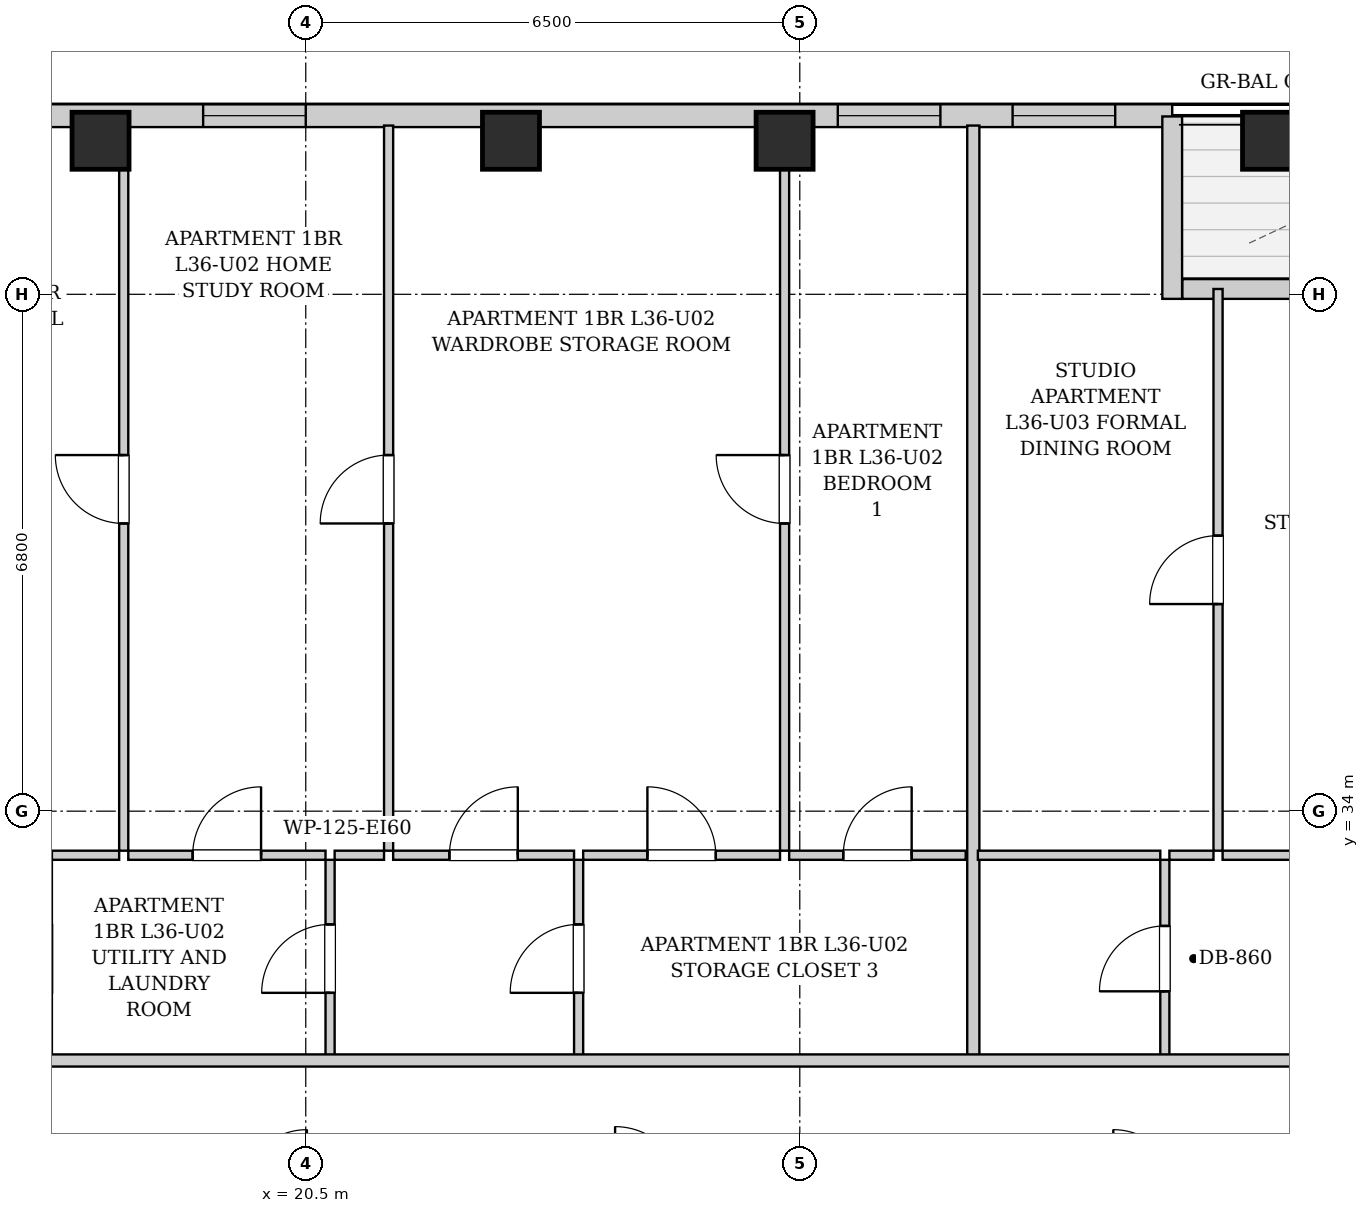
"""IFC4 building model, lengths in metres.
Left out: names, types, materials, properties, quantities, classifications, styles, units other than length and angle.
Written with IfcOpenShell. Run it as: python <this file> out.ifc"""

import sys

from ifc_helpers import new_model, si_unit, direction, frame, frame_2d, origin, origin_2d, place, context, subcontext, project, spatial, rectangle, extrude, element, fill, save


model = new_model("IFC4")
c1 = context("Model", 3, precision=1e-05, world=origin(), true_north=direction((0.0, 1.0)))
c2 = subcontext(c1, "Body", "Model", "MODEL_VIEW")
j1 = project(units=[si_unit("LENGTHUNIT", "METRE"), si_unit("PLANEANGLEUNIT", "RADIAN")], contexts=[c1])
p1 = place(None, origin())
s1 = spatial("IfcSite", under=j1, at=p1, CompositionType="ELEMENT")
p2 = place(p1, origin())
s2 = spatial("IfcBuilding", under=s1, at=p2, CompositionType="ELEMENT")
p3 = place(p2, frame((0.0, 0.0, 127.65)))
s3 = spatial("IfcBuildingStorey", under=s2, at=p3, CompositionType="ELEMENT", Elevation=127.65)
for number, where, z_axis, x_axis in (
    (1, (17.8, 42.82, 0.0), (0.0, 0.0, 1.0), (1.0, 0.0, 0.0)),
    (2, (23.2, 42.82, 0.0), (0.0, 0.0, 1.0), (1.0, 0.0, 0.0)),
    (3, (26.8, 42.82, 0.0), (0.0, 0.0, 1.0), (1.0, 0.0, 0.0)),
    (4, (33.2, 42.82, 0.0), (0.0, 0.0, 1.0), (1.0, 0.0, 0.0)),
):
    element("IfcColumn", number, at=place(p3, frame(where, z_axis=z_axis, x_axis=x_axis)), inside=s3, PredefinedType="COLUMN", context=c2, shape_type="SweptSolid", body=[
        extrude(rectangle(XDim=0.75, YDim=0.75, at=origin_2d()), origin(), (0.0, 0.0, 1.0), 3.25),
    ])
p4 = place(p3, frame((10.0, 43.15, 0.0), z_axis=(0.0, 0.0, 1.0), x_axis=(1.0, 0.0, 0.0)))
e5 = element("IfcWall", 5, at=p4, inside=s3, PredefinedType="SOLIDWALL", context=c2, shape_type="SweptSolid", body=[
    extrude(rectangle(XDim=21.9, YDim=0.3, at=frame_2d((10.95, 0.0))), origin(), (0.0, 0.0, 1.0), 2.99),
])
p5 = place(p4, frame((5.475, 0.0, 0.55)))
e6 = element("IfcOpeningElement", 6, at=p5, cuts=e5, PredefinedType="OPENING", context=c2, shape_type="SweptSolid", body=[
    extrude(rectangle(XDim=1.35, YDim=1.2, at=frame_2d((0.675, 0.6))), frame((0.0, 0.16, 0.0), z_axis=(0.0, -1.0, 0.0), x_axis=(1.0, 0.0, 0.0)), (0.0, 0.0, 1.0), 0.32),
])
p6 = place(p4, frame((9.15, 0.0, 0.55)))
e7 = element("IfcOpeningElement", 7, at=p6, cuts=e5, PredefinedType="OPENING", context=c2, shape_type="SweptSolid", body=[
    extrude(rectangle(XDim=1.35, YDim=1.2, at=frame_2d((0.675, 0.6))), frame((0.0, 0.16, 0.0), z_axis=(0.0, -1.0, 0.0), x_axis=(1.0, 0.0, 0.0)), (0.0, 0.0, 1.0), 0.32),
])
p7 = place(p4, frame((17.5, 0.0, 0.55)))
e8 = element("IfcOpeningElement", 8, at=p7, cuts=e5, PredefinedType="OPENING", context=c2, shape_type="SweptSolid", body=[
    extrude(rectangle(XDim=1.35, YDim=1.2, at=frame_2d((0.675, 0.6))), frame((0.0, 0.16, 0.0), z_axis=(0.0, -1.0, 0.0), x_axis=(1.0, 0.0, 0.0)), (0.0, 0.0, 1.0), 0.32),
])
p8 = place(p4, frame((19.8, 0.0, 0.55)))
e9 = element("IfcOpeningElement", 9, at=p8, cuts=e5, PredefinedType="OPENING", context=c2, shape_type="SweptSolid", body=[
    extrude(rectangle(XDim=1.35, YDim=1.2, at=frame_2d((0.675, 0.6))), frame((0.0, 0.16, 0.0), z_axis=(0.0, -1.0, 0.0), x_axis=(1.0, 0.0, 0.0)), (0.0, 0.0, 1.0), 0.32),
])
p9 = place(p3, frame((31.9, 43.14, 0.0), z_axis=(0.0, 0.0, 1.0), x_axis=(0.0, -1.0, 0.0)))
e10 = element("IfcWall", 10, at=p9, inside=s3, PredefinedType="SOLIDWALL", context=c2, shape_type="SweptSolid", body=[
    extrude(rectangle(XDim=2.4, YDim=0.26, at=frame_2d((1.2, 0.0))), origin(), (0.0, 0.0, 1.0), 2.99),
])
p10 = place(p3, frame((32.034, 40.87, 0.0), z_axis=(0.0, 0.0, 1.0), x_axis=(1.0, 0.0, 0.0)))
e11 = element("IfcWall", 11, at=p10, inside=s3, PredefinedType="SOLIDWALL", context=c2, shape_type="SweptSolid", body=[
    extrude(rectangle(XDim=4.332, YDim=0.26, at=frame_2d((2.166, 0.0))), origin(), (0.0, 0.0, 1.0), 2.99),
])
p11 = place(p10, frame((1.616, 0.0, 0.0)))
e12 = element("IfcOpeningElement", 12, at=p11, cuts=e11, PredefinedType="OPENING", context=c2, shape_type="SweptSolid", body=[
    extrude(rectangle(XDim=1.1, YDim=2.0, at=frame_2d((0.55, 1.0))), frame((0.0, 0.14, 0.0), z_axis=(0.0, -1.0, 0.0), x_axis=(1.0, 0.0, 0.0)), (0.0, 0.0, 1.0), 0.28),
])
p12 = place(p3, frame((20.82, 30.76, 0.0), z_axis=(0.0, 0.0, 1.0), x_axis=(0.0, 1.0, 0.0)))
e13 = element("IfcWall", 13, at=p12, inside=s3, PredefinedType="PARTITIONING", context=c2, shape_type="SweptSolid", body=[
    extrude(rectangle(XDim=2.6, YDim=0.12, at=frame_2d((1.3, 0.0))), origin(), (0.0, 0.0, 1.0), 2.99),
])
p13 = place(p12, frame((0.85, 0.0, 0.0)))
e14 = element("IfcOpeningElement", 14, at=p13, cuts=e13, PredefinedType="OPENING", context=c2, shape_type="SweptSolid", body=[
    extrude(rectangle(XDim=0.9, YDim=2.05, at=frame_2d((0.45, 1.025))), frame((0.0, 0.07, 0.0), z_axis=(0.0, -1.0, 0.0), x_axis=(1.0, 0.0, 0.0)), (0.0, 0.0, 1.0), 0.14),
])
p14 = place(p3, frame((17.16, 33.42, 0.0), z_axis=(0.0, 0.0, 1.0), x_axis=(1.0, 0.0, 0.0)))
e15 = element("IfcWall", 15, at=p14, inside=s3, PredefinedType="PARTITIONING", context=c2, shape_type="SweptSolid", body=[
    extrude(rectangle(XDim=0.885, YDim=0.12, at=frame_2d((0.442, 0.0))), origin(), (0.0, 0.0, 1.0), 2.99),
])
p15 = place(p3, frame((18.165, 33.42, 0.0), z_axis=(0.0, 0.0, 1.0), x_axis=(1.0, 0.0, 0.0)))
e16 = element("IfcWall", 16, at=p15, inside=s3, PredefinedType="PARTITIONING", context=c2, shape_type="SweptSolid", body=[
    extrude(rectangle(XDim=2.595, YDim=0.12, at=frame_2d((1.297, 0.0))), origin(), (0.0, 0.0, 1.0), 2.99),
])
p16 = place(p15, frame((0.847, 0.0, 0.0)))
e17 = element("IfcOpeningElement", 17, at=p16, cuts=e16, PredefinedType="OPENING", context=c2, shape_type="SweptSolid", body=[
    extrude(rectangle(XDim=0.9, YDim=2.05, at=frame_2d((0.45, 1.025))), frame((0.0, 0.07, 0.0), z_axis=(0.0, -1.0, 0.0), x_axis=(1.0, 0.0, 0.0)), (0.0, 0.0, 1.0), 0.14),
])
p17 = place(p3, frame((24.09, 30.76, 0.0), z_axis=(0.0, 0.0, 1.0), x_axis=(0.0, 1.0, 0.0)))
e18 = element("IfcWall", 18, at=p17, inside=s3, PredefinedType="PARTITIONING", context=c2, shape_type="SweptSolid", body=[
    extrude(rectangle(XDim=2.6, YDim=0.12, at=frame_2d((1.3, 0.0))), origin(), (0.0, 0.0, 1.0), 2.99),
])
p18 = place(p17, frame((0.85, 0.0, 0.0)))
e19 = element("IfcOpeningElement", 19, at=p18, cuts=e18, PredefinedType="OPENING", context=c2, shape_type="SweptSolid", body=[
    extrude(rectangle(XDim=0.9, YDim=2.05, at=frame_2d((0.45, 1.025))), frame((0.0, 0.07, 0.0), z_axis=(0.0, -1.0, 0.0), x_axis=(1.0, 0.0, 0.0)), (0.0, 0.0, 1.0), 0.14),
])
p19 = place(p3, frame((20.88, 33.42, 0.0), z_axis=(0.0, 0.0, 1.0), x_axis=(1.0, 0.0, 0.0)))
e20 = element("IfcWall", 20, at=p19, inside=s3, PredefinedType="PARTITIONING", context=c2, shape_type="SweptSolid", body=[
    extrude(rectangle(XDim=0.65, YDim=0.12, at=frame_2d((0.325, 0.0))), origin(), (0.0, 0.0, 1.0), 2.99),
])
p20 = place(p3, frame((21.65, 33.42, 0.0), z_axis=(0.0, 0.0, 1.0), x_axis=(1.0, 0.0, 0.0)))
e21 = element("IfcWall", 21, at=p20, inside=s3, PredefinedType="PARTITIONING", context=c2, shape_type="SweptSolid", body=[
    extrude(rectangle(XDim=2.38, YDim=0.12, at=frame_2d((1.19, 0.0))), origin(), (0.0, 0.0, 1.0), 2.99),
])
p21 = place(p20, frame((0.74, 0.0, 0.0)))
e22 = element("IfcOpeningElement", 22, at=p21, cuts=e21, PredefinedType="OPENING", context=c2, shape_type="SweptSolid", body=[
    extrude(rectangle(XDim=0.9, YDim=2.05, at=frame_2d((0.45, 1.025))), frame((0.0, 0.07, 0.0), z_axis=(0.0, -1.0, 0.0), x_axis=(1.0, 0.0, 0.0)), (0.0, 0.0, 1.0), 0.14),
])
p22 = place(p3, frame((24.15, 33.42, 0.0), z_axis=(0.0, 0.0, 1.0), x_axis=(1.0, 0.0, 0.0)))
e23 = element("IfcWall", 23, at=p22, inside=s3, PredefinedType="PARTITIONING", context=c2, shape_type="SweptSolid", body=[
    extrude(rectangle(XDim=2.59, YDim=0.12, at=frame_2d((1.295, 0.0))), origin(), (0.0, 0.0, 1.0), 2.99),
])
p23 = place(p22, frame((0.845, 0.0, 0.0)))
e24 = element("IfcOpeningElement", 24, at=p23, cuts=e23, PredefinedType="OPENING", context=c2, shape_type="SweptSolid", body=[
    extrude(rectangle(XDim=0.9, YDim=2.05, at=frame_2d((0.45, 1.025))), frame((0.0, 0.07, 0.0), z_axis=(0.0, -1.0, 0.0), x_axis=(1.0, 0.0, 0.0)), (0.0, 0.0, 1.0), 0.14),
])
p24 = place(p3, frame((26.86, 33.42, 0.0), z_axis=(0.0, 0.0, 1.0), x_axis=(1.0, 0.0, 0.0)))
e25 = element("IfcWall", 25, at=p24, inside=s3, PredefinedType="PARTITIONING", context=c2, shape_type="SweptSolid", body=[
    extrude(rectangle(XDim=2.323, YDim=0.12, at=frame_2d((1.162, 0.0))), origin(), (0.0, 0.0, 1.0), 2.99),
])
p25 = place(p24, frame((0.712, 0.0, 0.0)))
e26 = element("IfcOpeningElement", 26, at=p25, cuts=e25, PredefinedType="OPENING", context=c2, shape_type="SweptSolid", body=[
    extrude(rectangle(XDim=0.9, YDim=2.05, at=frame_2d((0.45, 1.025))), frame((0.0, 0.07, 0.0), z_axis=(0.0, -1.0, 0.0), x_axis=(1.0, 0.0, 0.0)), (0.0, 0.0, 1.0), 0.14),
])
p26 = place(p3, frame((18.105, 33.48, 0.0), z_axis=(0.0, 0.0, 1.0), x_axis=(0.0, 1.0, 0.0)))
e27 = element("IfcWall", 27, at=p26, inside=s3, PredefinedType="PARTITIONING", context=c2, shape_type="SweptSolid", body=[
    extrude(rectangle(XDim=9.54, YDim=0.12, at=frame_2d((4.77, 0.0))), origin(), (0.0, 0.0, 1.0), 2.99),
])
p27 = place(p26, frame((4.305, 0.0, 0.0)))
e28 = element("IfcOpeningElement", 28, at=p27, cuts=e27, PredefinedType="OPENING", context=c2, shape_type="SweptSolid", body=[
    extrude(rectangle(XDim=0.9, YDim=2.05, at=frame_2d((0.45, 1.025))), frame((0.0, 0.07, 0.0), z_axis=(0.0, -1.0, 0.0), x_axis=(1.0, 0.0, 0.0)), (0.0, 0.0, 1.0), 0.14),
])
p28 = place(p3, frame((21.59, 33.48, 0.0), z_axis=(0.0, 0.0, 1.0), x_axis=(0.0, 1.0, 0.0)))
e29 = element("IfcWall", 29, at=p28, inside=s3, PredefinedType="PARTITIONING", context=c2, shape_type="SweptSolid", body=[
    extrude(rectangle(XDim=9.54, YDim=0.12, at=frame_2d((4.77, 0.0))), origin(), (0.0, 0.0, 1.0), 2.99),
])
p29 = place(p28, frame((4.305, 0.0, 0.0)))
e30 = element("IfcOpeningElement", 30, at=p29, cuts=e29, PredefinedType="OPENING", context=c2, shape_type="SweptSolid", body=[
    extrude(rectangle(XDim=0.9, YDim=2.05, at=frame_2d((0.45, 1.025))), frame((0.0, 0.07, 0.0), z_axis=(0.0, -1.0, 0.0), x_axis=(1.0, 0.0, 0.0)), (0.0, 0.0, 1.0), 0.14),
])
p30 = place(p3, frame((26.8, 33.48, 0.0), z_axis=(0.0, 0.0, 1.0), x_axis=(0.0, 1.0, 0.0)))
e31 = element("IfcWall", 31, at=p30, inside=s3, PredefinedType="PARTITIONING", context=c2, shape_type="SweptSolid", body=[
    extrude(rectangle(XDim=9.54, YDim=0.12, at=frame_2d((4.77, 0.0))), origin(), (0.0, 0.0, 1.0), 2.99),
])
p31 = place(p30, frame((4.305, 0.0, 0.0)))
e32 = element("IfcOpeningElement", 32, at=p31, cuts=e31, PredefinedType="OPENING", context=c2, shape_type="SweptSolid", body=[
    extrude(rectangle(XDim=0.9, YDim=2.05, at=frame_2d((0.45, 1.025))), frame((0.0, 0.07, 0.0), z_axis=(0.0, -1.0, 0.0), x_axis=(1.0, 0.0, 0.0)), (0.0, 0.0, 1.0), 0.14),
])
p32 = place(p3, frame((29.283, 30.76, 0.0), z_axis=(0.0, 0.0, 1.0), x_axis=(0.0, 1.0, 0.0)))
e33 = element("IfcWall", 33, at=p32, inside=s3, PredefinedType="PARTITIONING", context=c2, shape_type="SweptSolid", body=[
    extrude(rectangle(XDim=12.26, YDim=0.16, at=frame_2d((6.13, 0.0))), origin(), (0.0, 0.0, 1.0), 2.99),
])
p33 = place(p3, frame((31.803, 30.76, 0.0), z_axis=(0.0, 0.0, 1.0), x_axis=(0.0, 1.0, 0.0)))
e34 = element("IfcWall", 34, at=p33, inside=s3, PredefinedType="PARTITIONING", context=c2, shape_type="SweptSolid", body=[
    extrude(rectangle(XDim=2.6, YDim=0.12, at=frame_2d((1.3, 0.0))), origin(), (0.0, 0.0, 1.0), 2.99),
])
p34 = place(p33, frame((0.87, 0.0, 0.0)))
e35 = element("IfcOpeningElement", 35, at=p34, cuts=e34, PredefinedType="OPENING", context=c2, shape_type="SweptSolid", body=[
    extrude(rectangle(XDim=0.86, YDim=2.05, at=frame_2d((0.43, 1.025))), frame((0.0, 0.07, 0.0), z_axis=(0.0, -1.0, 0.0), x_axis=(1.0, 0.0, 0.0)), (0.0, 0.0, 1.0), 0.14),
])
p35 = place(p3, frame((29.343, 33.42, 0.0), z_axis=(0.0, 0.0, 1.0), x_axis=(1.0, 0.0, 0.0)))
e36 = element("IfcWall", 36, at=p35, inside=s3, PredefinedType="PARTITIONING", context=c2, shape_type="SweptSolid", body=[
    extrude(rectangle(XDim=2.4, YDim=0.12, at=frame_2d((1.2, 0.0))), origin(), (0.0, 0.0, 1.0), 2.99),
])
p36 = place(p3, frame((31.863, 33.42, 0.0), z_axis=(0.0, 0.0, 1.0), x_axis=(1.0, 0.0, 0.0)))
e37 = element("IfcWall", 37, at=p36, inside=s3, PredefinedType="PARTITIONING", context=c2, shape_type="SweptSolid", body=[
    extrude(rectangle(XDim=0.58, YDim=0.12, at=frame_2d((0.29, 0.0))), origin(), (0.0, 0.0, 1.0), 2.99),
])
p37 = place(p3, frame((32.563, 33.42, 0.0), z_axis=(0.0, 0.0, 1.0), x_axis=(1.0, 0.0, 0.0)))
e38 = element("IfcWall", 38, at=p37, inside=s3, PredefinedType="PARTITIONING", context=c2, shape_type="SweptSolid", body=[
    extrude(rectangle(XDim=2.75, YDim=0.12, at=frame_2d((1.375, 0.0))), origin(), (0.0, 0.0, 1.0), 2.99),
])
p38 = place(p37, frame((0.925, 0.0, 0.0)))
e39 = element("IfcOpeningElement", 39, at=p38, cuts=e38, PredefinedType="OPENING", context=c2, shape_type="SweptSolid", body=[
    extrude(rectangle(XDim=0.9, YDim=2.05, at=frame_2d((0.45, 1.025))), frame((0.0, 0.07, 0.0), z_axis=(0.0, -1.0, 0.0), x_axis=(1.0, 0.0, 0.0)), (0.0, 0.0, 1.0), 0.14),
])
p39 = place(p3, frame((32.503, 33.48, 0.0), z_axis=(0.0, 0.0, 1.0), x_axis=(0.0, 1.0, 0.0)))
e40 = element("IfcWall", 40, at=p39, inside=s3, PredefinedType="PARTITIONING", context=c2, shape_type="SweptSolid", body=[
    extrude(rectangle(XDim=7.39, YDim=0.12, at=frame_2d((3.695, 0.0))), origin(), (0.0, 0.0, 1.0), 2.99),
])
p40 = place(p39, frame((3.245, 0.0, 0.0)))
e41 = element("IfcOpeningElement", 41, at=p40, cuts=e40, PredefinedType="OPENING", context=c2, shape_type="SweptSolid", body=[
    extrude(rectangle(XDim=0.9, YDim=2.05, at=frame_2d((0.45, 1.025))), frame((0.0, 0.07, 0.0), z_axis=(0.0, -1.0, 0.0), x_axis=(1.0, 0.0, 0.0)), (0.0, 0.0, 1.0), 0.14),
])
p41 = place(p3, frame((10.05, 30.72, 0.0), z_axis=(0.0, 0.0, 1.0), x_axis=(1.0, 0.0, 0.0)))
e42 = element("IfcWall", 42, at=p41, inside=s3, PredefinedType="PARTITIONING", context=c2, shape_type="SweptSolid", body=[
    extrude(rectangle(XDim=27.7, YDim=0.16, at=frame_2d((13.85, 0.0))), origin(), (0.0, 0.0, 1.0), 2.99),
])
p42 = place(p41, frame((4.295, 0.0, 0.0)))
e43 = element("IfcOpeningElement", 43, at=p42, cuts=e42, PredefinedType="OPENING", context=c2, shape_type="SweptSolid", body=[
    extrude(rectangle(XDim=0.95, YDim=2.1, at=frame_2d((0.475, 1.05))), frame((0.0, 0.09, 0.0), z_axis=(0.0, -1.0, 0.0), x_axis=(1.0, 0.0, 0.0)), (0.0, 0.0, 1.0), 0.18),
])
p43 = place(p41, frame((23.785, 0.0, 0.0)))
e44 = element("IfcOpeningElement", 44, at=p43, cuts=e42, PredefinedType="OPENING", context=c2, shape_type="SweptSolid", body=[
    extrude(rectangle(XDim=0.95, YDim=2.1, at=frame_2d((0.475, 1.05))), frame((0.0, 0.09, 0.0), z_axis=(0.0, -1.0, 0.0), x_axis=(1.0, 0.0, 0.0)), (0.0, 0.0, 1.0), 0.18),
])
p44 = place(p13, origin())
e45 = element("IfcDoor", 45, at=p44, inside=s3, OperationType="SINGLE_SWING_LEFT", PredefinedType="DOOR", context=c2, shape_type="SweptSolid", body=[
    extrude(rectangle(XDim=0.9, YDim=2.05, at=frame_2d((0.45, 1.025))), frame((0.0, 0.025, 0.0), z_axis=(0.0, -1.0, 0.0), x_axis=(1.0, 0.0, 0.0)), (0.0, 0.0, 1.0), 0.05),
])
fill(e14, e45)
p45 = place(p16, origin())
e46 = element("IfcDoor", 46, at=p45, inside=s3, OperationType="SINGLE_SWING_RIGHT", PredefinedType="DOOR", context=c2, shape_type="SweptSolid", body=[
    extrude(rectangle(XDim=0.9, YDim=2.05, at=frame_2d((0.45, 1.025))), frame((0.0, 0.025, 0.0), z_axis=(0.0, -1.0, 0.0), x_axis=(1.0, 0.0, 0.0)), (0.0, 0.0, 1.0), 0.05),
])
fill(e17, e46)
p46 = place(p18, origin())
e47 = element("IfcDoor", 47, at=p46, inside=s3, OperationType="SINGLE_SWING_LEFT", PredefinedType="DOOR", context=c2, shape_type="SweptSolid", body=[
    extrude(rectangle(XDim=0.9, YDim=2.05, at=frame_2d((0.45, 1.025))), frame((0.0, 0.025, 0.0), z_axis=(0.0, -1.0, 0.0), x_axis=(1.0, 0.0, 0.0)), (0.0, 0.0, 1.0), 0.05),
])
fill(e19, e47)
p47 = place(p21, origin())
e48 = element("IfcDoor", 48, at=p47, inside=s3, OperationType="SINGLE_SWING_RIGHT", PredefinedType="DOOR", context=c2, shape_type="SweptSolid", body=[
    extrude(rectangle(XDim=0.9, YDim=2.05, at=frame_2d((0.45, 1.025))), frame((0.0, 0.025, 0.0), z_axis=(0.0, -1.0, 0.0), x_axis=(1.0, 0.0, 0.0)), (0.0, 0.0, 1.0), 0.05),
])
fill(e22, e48)
p48 = place(p23, origin())
e49 = element("IfcDoor", 49, at=p48, inside=s3, OperationType="SINGLE_SWING_LEFT", PredefinedType="DOOR", context=c2, shape_type="SweptSolid", body=[
    extrude(rectangle(XDim=0.9, YDim=2.05, at=frame_2d((0.45, 1.025))), frame((0.0, 0.025, 0.0), z_axis=(0.0, -1.0, 0.0), x_axis=(1.0, 0.0, 0.0)), (0.0, 0.0, 1.0), 0.05),
])
fill(e24, e49)
p49 = place(p25, origin())
e50 = element("IfcDoor", 50, at=p49, inside=s3, OperationType="SINGLE_SWING_RIGHT", PredefinedType="DOOR", context=c2, shape_type="SweptSolid", body=[
    extrude(rectangle(XDim=0.9, YDim=2.05, at=frame_2d((0.45, 1.025))), frame((0.0, 0.025, 0.0), z_axis=(0.0, -1.0, 0.0), x_axis=(1.0, 0.0, 0.0)), (0.0, 0.0, 1.0), 0.05),
])
fill(e26, e50)
p50 = place(p27, origin())
e51 = element("IfcDoor", 51, at=p50, inside=s3, OperationType="SINGLE_SWING_RIGHT", PredefinedType="DOOR", context=c2, shape_type="SweptSolid", body=[
    extrude(rectangle(XDim=0.9, YDim=2.05, at=frame_2d((0.45, 1.025))), frame((0.0, 0.025, 0.0), z_axis=(0.0, -1.0, 0.0), x_axis=(1.0, 0.0, 0.0)), (0.0, 0.0, 1.0), 0.05),
])
fill(e28, e51)
p51 = place(p29, origin())
e52 = element("IfcDoor", 52, at=p51, inside=s3, OperationType="SINGLE_SWING_LEFT", PredefinedType="DOOR", context=c2, shape_type="SweptSolid", body=[
    extrude(rectangle(XDim=0.9, YDim=2.05, at=frame_2d((0.45, 1.025))), frame((0.0, 0.025, 0.0), z_axis=(0.0, -1.0, 0.0), x_axis=(1.0, 0.0, 0.0)), (0.0, 0.0, 1.0), 0.05),
])
fill(e30, e52)
p52 = place(p31, origin())
e53 = element("IfcDoor", 53, at=p52, inside=s3, OperationType="SINGLE_SWING_RIGHT", PredefinedType="DOOR", context=c2, shape_type="SweptSolid", body=[
    extrude(rectangle(XDim=0.9, YDim=2.05, at=frame_2d((0.45, 1.025))), frame((0.0, 0.025, 0.0), z_axis=(0.0, -1.0, 0.0), x_axis=(1.0, 0.0, 0.0)), (0.0, 0.0, 1.0), 0.05),
])
fill(e32, e53)
p53 = place(p34, origin())
e54 = element("IfcDoor", 54, at=p53, inside=s3, OperationType="SINGLE_SWING_LEFT", PredefinedType="DOOR", context=c2, shape_type="SweptSolid", body=[
    extrude(rectangle(XDim=0.86, YDim=2.05, at=frame_2d((0.43, 1.025))), frame((0.0, 0.025, 0.0), z_axis=(0.0, -1.0, 0.0), x_axis=(1.0, 0.0, 0.0)), (0.0, 0.0, 1.0), 0.05),
])
fill(e35, e54)
p54 = place(p40, origin())
e55 = element("IfcDoor", 55, at=p54, inside=s3, OperationType="SINGLE_SWING_LEFT", PredefinedType="DOOR", context=c2, shape_type="SweptSolid", body=[
    extrude(rectangle(XDim=0.9, YDim=2.05, at=frame_2d((0.45, 1.025))), frame((0.0, 0.025, 0.0), z_axis=(0.0, -1.0, 0.0), x_axis=(1.0, 0.0, 0.0)), (0.0, 0.0, 1.0), 0.05),
])
fill(e41, e55)
p55 = place(p6, origin())
e56 = element("IfcWindow", 56, at=p55, inside=s3, PartitioningType="SINGLE_PANEL", PredefinedType="WINDOW", context=c2, shape_type="SweptSolid", body=[
    extrude(rectangle(XDim=1.35, YDim=1.2, at=frame_2d((0.675, 0.6))), frame((0.0, 0.03, 0.0), z_axis=(0.0, -1.0, 0.0), x_axis=(1.0, 0.0, 0.0)), (0.0, 0.0, 1.0), 0.06),
])
fill(e7, e56)
p56 = place(p7, origin())
e57 = element("IfcWindow", 57, at=p56, inside=s3, PartitioningType="SINGLE_PANEL", PredefinedType="WINDOW", context=c2, shape_type="SweptSolid", body=[
    extrude(rectangle(XDim=1.35, YDim=1.2, at=frame_2d((0.675, 0.6))), frame((0.0, 0.03, 0.0), z_axis=(0.0, -1.0, 0.0), x_axis=(1.0, 0.0, 0.0)), (0.0, 0.0, 1.0), 0.06),
])
fill(e8, e57)
p57 = place(p8, origin())
e58 = element("IfcWindow", 58, at=p57, inside=s3, PartitioningType="SINGLE_PANEL", PredefinedType="WINDOW", context=c2, shape_type="SweptSolid", body=[
    extrude(rectangle(XDim=1.35, YDim=1.2, at=frame_2d((0.675, 0.6))), frame((0.0, 0.03, 0.0), z_axis=(0.0, -1.0, 0.0), x_axis=(1.0, 0.0, 0.0)), (0.0, 0.0, 1.0), 0.06),
])
fill(e9, e58)
save(model, sys.argv[1])
